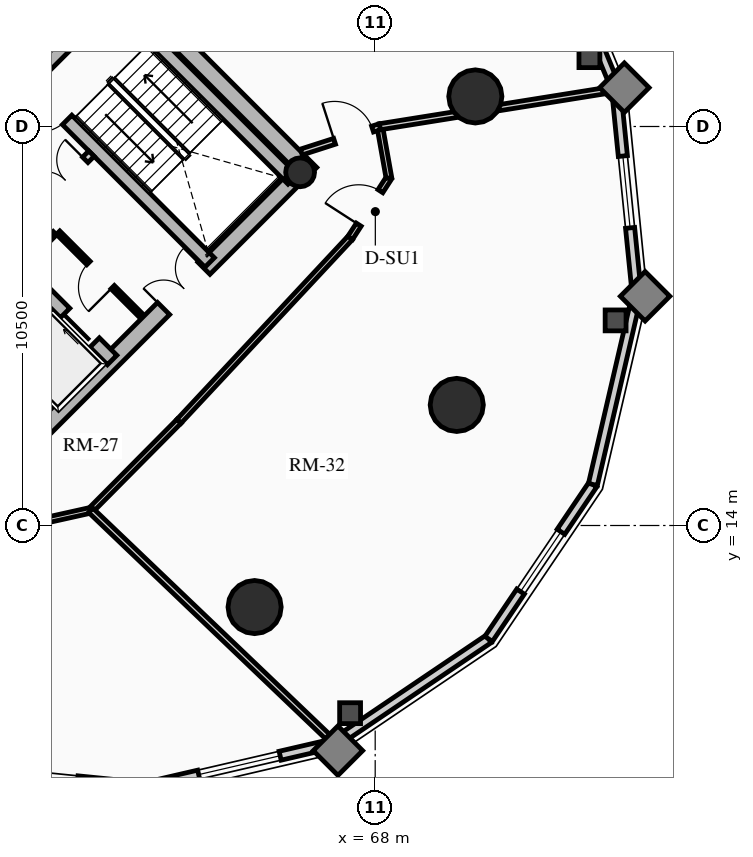
"""IFC4 building model, lengths in metres.
Left out: names, types, materials, properties, quantities, classifications, styles, units other than length and angle.
Written with IfcOpenShell. Run it as: python <this file> out.ifc"""

import sys

from ifc_helpers import new_model, si_unit, direction, frame, frame_2d, origin, origin_2d, place, context, subcontext, project, spatial, rectangle, circle, hollow_circle, extrude, source, transform, mapped, element, fill, save


model = new_model("IFC4")
c1 = context("Model", 3, precision=1e-05, world=origin(), true_north=direction((0.0, 1.0)))
c2 = subcontext(c1, "Body", "Model", "MODEL_VIEW")
j1 = project(units=[si_unit("LENGTHUNIT", "METRE"), si_unit("PLANEANGLEUNIT", "RADIAN")], contexts=[c1])
p1 = place(None, origin())
s1 = spatial("IfcSite", under=j1, at=p1, CompositionType="ELEMENT")
p2 = place(p1, origin())
s2 = spatial("IfcBuilding", under=s1, at=p2, CompositionType="ELEMENT")
p3 = place(p2, frame((0.0, 0.0, 140.32)))
s3 = spatial("IfcBuildingStorey", under=s2, at=p3, CompositionType="ELEMENT", Elevation=140.32)
p4 = place(p3, frame((66.303, 23.263, 0.0), z_axis=(0.0, 0.0, 1.0), x_axis=(-0.707106781187, 0.707106781187, 0.0)))
e1 = element("IfcWall", 1, at=p4, inside=s3, PredefinedType="SHEAR", context=c2, shape_type="SweptSolid", body=[
    extrude(rectangle(XDim=14.2, YDim=0.45, at=frame_2d((7.1, 0.0))), origin(), (0.0, 0.0, 1.0), 3.72),
])
p5 = place(p3, frame((58.578, 15.856, 0.0), z_axis=(0.0, 0.0, 1.0), x_axis=(0.707106781187, 0.707106781187, 0.0)))
e2 = element("IfcWall", 2, at=p5, inside=s3, PredefinedType="SHEAR", context=c2, shape_type="SweptSolid", body=[
    extrude(rectangle(XDim=10.7, YDim=0.45, at=frame_2d((5.35, 0.0))), origin(), (0.0, 0.0, 1.0), 3.72),
])
m1 = source(origin(), c2, "Body", "SweptSolid", [
    extrude(rectangle(XDim=1.5, YDim=2.02, at=frame_2d((0.75, 1.01))), frame((0.0, 0.235, 0.0), z_axis=(0.0, -1.0, 0.0), x_axis=(1.0, 0.0, 0.0)), (0.0, 0.0, 1.0), 0.47),
])
p6 = place(p5, frame((5.45, 0.0, 0.0)))
e3 = element("IfcOpeningElement", 3, at=p6, cuts=e2, PredefinedType="OPENING", context=c2, shape_type="MappedRepresentation", body=[
    mapped(m1, transform((0.0, 0.0, 0.0), x_axis=(1.0, 0.0, 0.0), y_axis=(0.0, 1.0, 0.0), z_axis=(0.0, 0.0, 1.0), scale=1.0)),
])
p7 = place(p3, frame((61.078, 18.355, 0.0), z_axis=(0.0, 0.0, 1.0), x_axis=(-0.707106781187, 0.707106781187, 0.0)))
e4 = element("IfcWall", 4, at=p7, inside=s3, PredefinedType="SHEAR", context=c2, shape_type="SweptSolid", body=[
    extrude(rectangle(XDim=13.75, YDim=0.35, at=frame_2d((6.875, 0.0))), origin(), (0.0, 0.0, 1.0), 3.72),
])
m2 = source(origin(), c2, "Body", "SweptSolid", [
    extrude(rectangle(XDim=1.1, YDim=2.015, at=frame_2d((0.55, 1.007))), frame((0.0, 0.185, 0.0), z_axis=(0.0, -1.0, 0.0), x_axis=(1.0, 0.0, 0.0)), (0.0, 0.0, 1.0), 0.37),
])
p8 = place(p7, frame((4.875, 0.0, 0.0)))
e5 = element("IfcOpeningElement", 5, at=p8, cuts=e4, PredefinedType="OPENING", context=c2, shape_type="MappedRepresentation", body=[
    mapped(m2, transform((0.0, 0.0, 0.0), x_axis=(1.0, 0.0, 0.0), y_axis=(0.0, 1.0, 0.0), z_axis=(0.0, 0.0, 1.0), scale=1.0)),
])
p9 = place(p7, frame((0.65, 0.0, 0.0)))
e6 = element("IfcOpeningElement", 6, at=p9, cuts=e4, PredefinedType="OPENING", context=c2, shape_type="MappedRepresentation", body=[
    mapped(m2, transform((0.0, 0.0, 0.0), x_axis=(1.0, 0.0, 0.0), y_axis=(0.0, 1.0, 0.0), z_axis=(0.0, 0.0, 1.0), scale=1.0)),
])
p10 = place(p7, frame((2.65, 0.0, 0.0)))
e7 = element("IfcOpeningElement", 7, at=p10, cuts=e4, PredefinedType="OPENING", context=c2, shape_type="MappedRepresentation", body=[
    mapped(m2, transform((0.0, 0.0, 0.0), x_axis=(1.0, 0.0, 0.0), y_axis=(0.0, 1.0, 0.0), z_axis=(0.0, 0.0, 1.0), scale=1.0)),
])
m3 = source(origin(), c2, "Body", "SweptSolid", [
    extrude(rectangle(XDim=1.15, YDim=2.02, at=frame_2d((0.575, 1.01))), frame((0.0, 0.185, 0.0), z_axis=(0.0, -1.0, 0.0), x_axis=(1.0, 0.0, 0.0)), (0.0, 0.0, 1.0), 0.37),
])
p11 = place(p7, frame((7.295, 0.0, 0.0)))
e8 = element("IfcOpeningElement", 8, at=p11, cuts=e4, PredefinedType="OPENING", context=c2, shape_type="MappedRepresentation", body=[
    mapped(m3, transform((0.0, 0.0, 0.0), x_axis=(1.0, 0.0, 0.0), y_axis=(0.0, 1.0, 0.0), z_axis=(0.0, 0.0, 1.0), scale=1.0)),
])
p12 = place(p3, frame((63.645, 20.922, 0.0), z_axis=(0.0, 0.0, 1.0), x_axis=(-0.70711946392, 0.707094098226, 0.0)))
e9 = element("IfcWall", 9, at=p12, inside=s3, PredefinedType="SHEAR", context=c2, shape_type="SweptSolid", body=[
    extrude(rectangle(XDim=9.625, YDim=0.35, at=frame_2d((4.812, 0.0))), origin(), (0.0, 0.0, 1.0), 3.72),
])
p13 = place(p12, frame((5.305, 0.0, 0.0)))
e10 = element("IfcOpeningElement", 10, at=p13, cuts=e9, PredefinedType="OPENING", context=c2, shape_type="MappedRepresentation", body=[
    mapped(m3, transform((0.0, 0.0, 0.0), x_axis=(1.0, 0.0, 0.0), y_axis=(0.0, 1.0, 0.0), z_axis=(0.0, 0.0, 1.0), scale=1.0)),
])
p14 = place(p3, frame((65.83, 23.107, 0.0), z_axis=(0.0, 0.0, 1.0), x_axis=(-0.707088616009, 0.707124945897, 0.0)))
e11 = element("IfcWall", 11, at=p14, inside=s3, PredefinedType="SHEAR", context=c2, shape_type="SweptSolid", body=[
    extrude(rectangle(XDim=6.72, YDim=0.35, at=frame_2d((3.36, 0.0))), origin(), (0.0, 0.0, 1.0), 3.72),
])
p15 = place(p3, frame((58.893, 25.674, 0.0), z_axis=(0.0, 0.0, 1.0), x_axis=(0.707106781187, 0.707106781187, 0.0)))
e12 = element("IfcWall", 12, at=p15, inside=s3, PredefinedType="SHEAR", context=c2, shape_type="SweptSolid", body=[
    extrude(rectangle(XDim=3.285, YDim=0.35, at=frame_2d((1.643, 0.0))), origin(), (0.0, 0.0, 1.0), 3.72),
])
p16 = place(p3, frame((66.024, 23.294, 0.0), z_axis=(0.0, 0.0, 1.0), x_axis=(0.707106781187, 0.707106781187, 0.0)))
e13 = element("IfcColumn", 13, at=p16, inside=s3, PredefinedType="COLUMN", context=c2, shape_type="SweptSolid", body=[
    extrude(hollow_circle(Radius=0.38, WallThickness=0.032, at=origin_2d()), origin(), (0.0, 0.0, 1.0), 3.72),
])
for number, where, z_axis, x_axis in (
    (14, (64.827, 11.854, 0.0), (0.0, 0.0, 1.0), (1.0, 0.0, 0.0)),
    (15, (70.146, 17.173, 0.0), (0.0, 0.0, 1.0), (1.0, 0.0, 0.0)),
    (16, (70.635, 25.291, 0.0), (0.0, 0.0, 1.0), (1.0, 0.0, 0.0)),
):
    element("IfcColumn", number, at=place(p3, frame(where, z_axis=z_axis, x_axis=x_axis)), inside=s3, PredefinedType="USERDEFINED", context=c2, shape_type="SweptSolid", body=[
        extrude(circle(Radius=0.7, at=origin_2d()), origin(), (0.0, 0.0, 1.0), 3.72),
    ])
p17 = place(p3, frame((61.933, 7.115, 0.0), z_axis=(0.0, 0.0, 1.0), x_axis=(-0.994971754311, 0.10015591906, 0.0)))
e17 = element("IfcWall", 17, at=p17, inside=s3, PredefinedType="SOLIDWALL", context=c2, shape_type="SweptSolid", body=[
    extrude(rectangle(XDim=5.448, YDim=0.24, at=frame_2d((2.724, 0.0))), origin(), (0.0, 0.0, 1.0), 3.465),
])
m4 = source(origin(), c2, "Body", "SweptSolid", [
    extrude(rectangle(XDim=1.9, YDim=1.35, at=frame_2d((0.95, 0.675))), frame((0.0, 0.13, 0.0), z_axis=(0.0, -1.0, 0.0), x_axis=(1.0, 0.0, 0.0)), (0.0, 0.0, 1.0), 0.26),
])
p18 = place(p17, frame((1.774, 0.0, 0.65)))
e18 = element("IfcOpeningElement", 18, at=p18, cuts=e17, PredefinedType="OPENING", context=c2, shape_type="MappedRepresentation", body=[
    mapped(m4, transform((0.0, 0.0, 0.0), x_axis=(1.0, 0.0, 0.0), y_axis=(0.0, 1.0, 0.0), z_axis=(0.0, 0.0, 1.0), scale=1.0)),
])
p19 = place(p3, frame((66.92, 8.271, 0.0), z_axis=(0.0, 0.0, 1.0), x_axis=(-0.974165631126, -0.225834725257, 0.0)))
e19 = element("IfcWall", 19, at=p19, inside=s3, PredefinedType="SOLIDWALL", context=c2, shape_type="SweptSolid", body=[
    extrude(rectangle(XDim=5.119, YDim=0.24, at=frame_2d((2.56, 0.0))), origin(), (0.0, 0.0, 1.0), 3.465),
])
m5 = source(origin(), c2, "Body", "SweptSolid", [
    extrude(rectangle(XDim=2.2, YDim=1.35, at=frame_2d((1.1, 0.675))), frame((0.0, 0.13, 0.0), z_axis=(0.0, -1.0, 0.0), x_axis=(1.0, 0.0, 0.0)), (0.0, 0.0, 1.0), 0.26),
])
p20 = place(p19, frame((1.459, 0.0, 0.65)))
e20 = element("IfcOpeningElement", 20, at=p20, cuts=e19, PredefinedType="OPENING", context=c2, shape_type="MappedRepresentation", body=[
    mapped(m5, transform((0.0, 0.0, 0.0), x_axis=(1.0, 0.0, 0.0), y_axis=(0.0, 1.0, 0.0), z_axis=(0.0, 0.0, 1.0), scale=1.0)),
])
p21 = place(p3, frame((70.985, 11.015, 0.0), z_axis=(0.0, 0.0, 1.0), x_axis=(-0.828781148131, -0.559572880421, 0.0)))
e21 = element("IfcWall", 21, at=p21, inside=s3, PredefinedType="SOLIDWALL", context=c2, shape_type="SweptSolid", body=[
    extrude(rectangle(XDim=4.905, YDim=0.24, at=frame_2d((2.452, 0.0))), origin(), (0.0, 0.0, 1.0), 3.465),
])
p22 = place(p3, frame((73.729, 15.08, 0.0), z_axis=(0.0, 0.0, 1.0), x_axis=(-0.559572880421, -0.828781148131, 0.0)))
e22 = element("IfcWall", 22, at=p22, inside=s3, PredefinedType="SOLIDWALL", context=c2, shape_type="SweptSolid", body=[
    extrude(rectangle(XDim=4.905, YDim=0.24, at=frame_2d((2.452, 0.0))), origin(), (0.0, 0.0, 1.0), 3.465),
])
p23 = place(p22, frame((1.502, 0.0, 0.65)))
e23 = element("IfcOpeningElement", 23, at=p23, cuts=e22, PredefinedType="OPENING", context=c2, shape_type="MappedRepresentation", body=[
    mapped(m4, transform((0.0, 0.0, 0.0), x_axis=(1.0, 0.0, 0.0), y_axis=(0.0, 1.0, 0.0), z_axis=(0.0, 0.0, 1.0), scale=1.0)),
])
p24 = place(p3, frame((74.885, 20.067, 0.0), z_axis=(0.0, 0.0, 1.0), x_axis=(-0.225834725257, -0.974165631126, 0.0)))
e24 = element("IfcWall", 24, at=p24, inside=s3, PredefinedType="SOLIDWALL", context=c2, shape_type="SweptSolid", body=[
    extrude(rectangle(XDim=5.119, YDim=0.24, at=frame_2d((2.56, 0.0))), origin(), (0.0, 0.0, 1.0), 3.465),
])
p25 = place(p3, frame((74.339, 25.487, 0.0), z_axis=(0.0, 0.0, 1.0), x_axis=(0.10015591906, -0.994971754311, 0.0)))
e25 = element("IfcWall", 25, at=p25, inside=s3, PredefinedType="SOLIDWALL", context=c2, shape_type="SweptSolid", body=[
    extrude(rectangle(XDim=5.448, YDim=0.24, at=frame_2d((2.724, 0.0))), origin(), (0.0, 0.0, 1.0), 3.465),
])
p26 = place(p25, frame((1.774, 0.0, 0.65)))
e26 = element("IfcOpeningElement", 26, at=p26, cuts=e25, PredefinedType="OPENING", context=c2, shape_type="MappedRepresentation", body=[
    mapped(m4, transform((0.0, 0.0, 0.0), x_axis=(1.0, 0.0, 0.0), y_axis=(0.0, 1.0, 0.0), z_axis=(0.0, 0.0, 1.0), scale=1.0)),
])
p27 = place(p3, frame((72.145, 30.811, 0.0), z_axis=(0.0, 0.0, 1.0), x_axis=(0.381027003055, -0.924563909604, 0.0)))
e27 = element("IfcWall", 27, at=p27, inside=s3, PredefinedType="SOLIDWALL", context=c2, shape_type="SweptSolid", body=[
    extrude(rectangle(XDim=5.758, YDim=0.24, at=frame_2d((2.879, 0.0))), origin(), (0.0, 0.0, 1.0), 3.465),
])
p28 = place(p3, frame((58.214, 21.467, 0.0), z_axis=(0.0, 0.0, 1.0), x_axis=(0.707106781187, 0.707106781187, 0.0)))
e28 = element("IfcWall", 28, at=p28, inside=s3, PredefinedType="PARTITIONING", context=c2, shape_type="SweptSolid", body=[
    extrude(rectangle(XDim=3.28, YDim=0.2, at=frame_2d((1.64, 0.0))), origin(), (0.0, 0.0, 1.0), 3.465),
])
m6 = source(origin(), c2, "Body", "SweptSolid", [
    extrude(rectangle(XDim=1.5, YDim=2.02, at=frame_2d((0.75, 1.01))), frame((0.0, 0.11, 0.0), z_axis=(0.0, -1.0, 0.0), x_axis=(1.0, 0.0, 0.0)), (0.0, 0.0, 1.0), 0.22),
])
p29 = place(p28, frame((1.55, 0.0, 0.0)))
e29 = element("IfcOpeningElement", 29, at=p29, cuts=e28, PredefinedType="OPENING", context=c2, shape_type="MappedRepresentation", body=[
    mapped(m6, transform((0.0, 0.0, 0.0), x_axis=(1.0, 0.0, 0.0), y_axis=(0.0, 1.0, 0.0), z_axis=(0.0, 0.0, 1.0), scale=1.0)),
])
p30 = place(p3, frame((61.835, 19.529, 0.0), z_axis=(0.0, 0.0, 1.0), x_axis=(-0.707146413884, 0.707067146267, 0.0)))
e30 = element("IfcWall", 30, at=p30, inside=s3, PredefinedType="PARTITIONING", context=c2, shape_type="SweptSolid", body=[
    extrude(rectangle(XDim=3.08, YDim=0.125, at=frame_2d((1.54, 0.0))), origin(), (0.0, 0.0, 1.0), 3.465),
])
m7 = source(origin(), c2, "Body", "SweptSolid", [
    extrude(rectangle(XDim=0.9, YDim=2.005, at=frame_2d((0.45, 1.002))), frame((0.0, 0.073, 0.0), z_axis=(0.0, -1.0, 0.0), x_axis=(1.0, 0.0, 0.0)), (0.0, 0.0, 1.0), 0.145),
])
p31 = place(p30, frame((1.05, 0.0, 0.0)))
e31 = element("IfcOpeningElement", 31, at=p31, cuts=e30, PredefinedType="OPENING", context=c2, shape_type="MappedRepresentation", body=[
    mapped(m7, transform((0.0, 0.0, 0.0), x_axis=(1.0, 0.0, 0.0), y_axis=(0.0, 1.0, 0.0), z_axis=(0.0, 0.0, 1.0), scale=1.0)),
])
p32 = place(p3, frame((58.794, 20.915, 0.0), z_axis=(0.0, 0.0, 1.0), x_axis=(0.707106781187, 0.707106781187, 0.0)))
e32 = element("IfcWall", 32, at=p32, inside=s3, PredefinedType="PARTITIONING", context=c2, shape_type="SweptSolid", body=[
    extrude(rectangle(XDim=1.1, YDim=0.125, at=frame_2d((0.55, 0.0))), origin(), (0.0, 0.0, 1.0), 3.465),
])
p33 = place(p3, frame((58.971, 14.057, 0.0), z_axis=(0.0, 0.0, 1.0), x_axis=(0.976085233804, 0.217388169756, 0.0)))
e33 = element("IfcWall", 33, at=p33, inside=s3, PredefinedType="PARTITIONING", context=c2, shape_type="SweptSolid", body=[
    extrude(rectangle(XDim=1.581, YDim=0.15, at=frame_2d((0.791, 0.0))), origin(), (0.0, 0.0, 1.0), 3.035),
])
p34 = place(p3, frame((60.515, 14.401, 0.0), z_axis=(0.0, 0.0, 1.0), x_axis=(0.704179607439, 0.710021887316, 0.0)))
e34 = element("IfcWall", 34, at=p34, inside=s3, PredefinedType="PARTITIONING", context=c2, shape_type="SweptSolid", body=[
    extrude(rectangle(XDim=3.301, YDim=0.15, at=frame_2d((1.651, 0.0))), origin(), (0.0, 0.0, 1.0), 3.035),
])
p35 = place(p3, frame((62.839, 16.745, 0.0), z_axis=(0.0, 0.0, 1.0), x_axis=(0.682386779427, 0.73099130177, 0.0)))
e35 = element("IfcWall", 35, at=p35, inside=s3, PredefinedType="PARTITIONING", context=c2, shape_type="SweptSolid", body=[
    extrude(rectangle(XDim=6.6, YDim=0.15, at=frame_2d((3.3, 0.0))), origin(), (0.0, 0.0, 1.0), 3.035),
])
p36 = place(p3, frame((67.343, 21.569, 0.0), z_axis=(0.0, 0.0, 1.0), x_axis=(0.542722446786, 0.83991210597, 0.0)))
e36 = element("IfcWall", 36, at=p36, inside=s3, PredefinedType="PARTITIONING", context=c2, shape_type="SweptSolid", body=[
    extrude(rectangle(XDim=1.876, YDim=0.15, at=frame_2d((0.938, 0.0))), origin(), (0.0, 0.0, 1.0), 3.035),
])
m8 = source(origin(), c2, "Body", "SweptSolid", [
    extrude(rectangle(XDim=1.05, YDim=2.015, at=frame_2d((0.525, 1.007))), frame((0.0, 0.085, 0.0), z_axis=(0.0, -1.0, 0.0), x_axis=(1.0, 0.0, 0.0)), (0.0, 0.0, 1.0), 0.17),
])
p37 = place(p36, frame((0.413, 0.0, 0.0)))
e37 = element("IfcOpeningElement", 37, at=p37, cuts=e36, PredefinedType="OPENING", context=c2, shape_type="MappedRepresentation", body=[
    mapped(m8, transform((0.0, 0.0, 0.0), x_axis=(1.0, 0.0, 0.0), y_axis=(0.0, 1.0, 0.0), z_axis=(0.0, 0.0, 1.0), scale=1.0)),
])
p38 = place(p3, frame((68.362, 23.145, 0.0), z_axis=(0.0, 0.0, 1.0), x_axis=(-0.175605524171, 0.984460613677, 0.0)))
e38 = element("IfcWall", 38, at=p38, inside=s3, PredefinedType="PARTITIONING", context=c2, shape_type="SweptSolid", body=[
    extrude(rectangle(XDim=1.369, YDim=0.15, at=frame_2d((0.685, 0.0))), origin(), (0.0, 0.0, 1.0), 3.035),
])
p39 = place(p3, frame((60.515, 14.401, 0.0), z_axis=(0.0, 0.0, 1.0), x_axis=(0.722998961483, -0.690849116446, 0.0)))
e39 = element("IfcWall", 39, at=p39, inside=s3, PredefinedType="PARTITIONING", context=c2, shape_type="SweptSolid", body=[
    extrude(rectangle(XDim=8.847, YDim=0.16, at=frame_2d((4.423, 0.0))), origin(), (0.0, 0.0, 1.0), 2.989),
])
p40 = place(p3, frame((68.121, 24.493, 0.0), z_axis=(0.0, 0.0, 1.0), x_axis=(0.987466345552, 0.15782970697, 0.0)))
e40 = element("IfcWall", 40, at=p40, inside=s3, PredefinedType="PARTITIONING", context=c2, shape_type="SweptSolid", body=[
    extrude(rectangle(XDim=6.277, YDim=0.16, at=frame_2d((3.139, 0.0))), origin(), (0.0, 0.0, 1.0), 2.989),
])
p41 = place(p3, frame((66.056, 23.828, 0.0), z_axis=(0.0, 0.0, 1.0), x_axis=(0.951830504244, 0.306624674792, 0.0)))
e41 = element("IfcWall", 41, at=p41, inside=s3, PredefinedType="PARTITIONING", context=c2, shape_type="SweptSolid", body=[
    extrude(rectangle(XDim=2.17, YDim=0.16, at=frame_2d((1.085, 0.0))), origin(), (0.0, 0.0, 1.0), 3.035),
])
m9 = source(origin(), c2, "Body", "SweptSolid", [
    extrude(rectangle(XDim=1.05, YDim=2.015, at=frame_2d((0.525, 1.007))), frame((0.0, 0.09, 0.0), z_axis=(0.0, -1.0, 0.0), x_axis=(1.0, 0.0, 0.0)), (0.0, 0.0, 1.0), 0.18),
])
p42 = place(p41, frame((0.92, 0.0, 0.0)))
e42 = element("IfcOpeningElement", 42, at=p42, cuts=e41, PredefinedType="OPENING", context=c2, shape_type="MappedRepresentation", body=[
    mapped(m9, transform((0.0, 0.0, 0.0), x_axis=(1.0, 0.0, 0.0), y_axis=(0.0, 1.0, 0.0), z_axis=(0.0, 0.0, 1.0), scale=1.0)),
])
m10 = source(origin(), c2, "Body", "SweptSolid", [
    extrude(rectangle(XDim=1.9, YDim=1.35, at=frame_2d((0.95, 0.675))), frame((0.0, 0.03, 0.0), z_axis=(0.0, -1.0, 0.0), x_axis=(1.0, 0.0, 0.0)), (0.0, 0.0, 1.0), 0.06),
])
p43 = place(p18, origin())
e43 = element("IfcWindow", 43, at=p43, inside=s3, PartitioningType="DOUBLE_PANEL_VERTICAL", PredefinedType="WINDOW", context=c2, shape_type="MappedRepresentation", body=[
    mapped(m10, transform((0.0, 0.0, 0.0), x_axis=(1.0, 0.0, 0.0), y_axis=(0.0, 1.0, 0.0), z_axis=(0.0, 0.0, 1.0), scale=1.0)),
])
fill(e18, e43)
m11 = source(origin(), c2, "Body", "SweptSolid", [
    extrude(rectangle(XDim=2.2, YDim=1.35, at=frame_2d((1.1, 0.675))), frame((0.0, 0.03, 0.0), z_axis=(0.0, -1.0, 0.0), x_axis=(1.0, 0.0, 0.0)), (0.0, 0.0, 1.0), 0.06),
])
p44 = place(p20, origin())
e44 = element("IfcWindow", 44, at=p44, inside=s3, PartitioningType="DOUBLE_PANEL_VERTICAL", PredefinedType="WINDOW", context=c2, shape_type="MappedRepresentation", body=[
    mapped(m11, transform((0.0, 0.0, 0.0), x_axis=(1.0, 0.0, 0.0), y_axis=(0.0, 1.0, 0.0), z_axis=(0.0, 0.0, 1.0), scale=1.0)),
])
fill(e20, e44)
p45 = place(p23, origin())
e45 = element("IfcWindow", 45, at=p45, inside=s3, PartitioningType="DOUBLE_PANEL_VERTICAL", PredefinedType="WINDOW", context=c2, shape_type="MappedRepresentation", body=[
    mapped(m10, transform((0.0, 0.0, 0.0), x_axis=(1.0, 0.0, 0.0), y_axis=(0.0, 1.0, 0.0), z_axis=(0.0, 0.0, 1.0), scale=1.0)),
])
fill(e23, e45)
p46 = place(p26, origin())
e46 = element("IfcWindow", 46, at=p46, inside=s3, PartitioningType="DOUBLE_PANEL_VERTICAL", PredefinedType="WINDOW", context=c2, shape_type="MappedRepresentation", body=[
    mapped(m10, transform((0.0, 0.0, 0.0), x_axis=(1.0, 0.0, 0.0), y_axis=(0.0, 1.0, 0.0), z_axis=(0.0, 0.0, 1.0), scale=1.0)),
])
fill(e26, e46)
m12 = source(origin(), c2, "Body", "SweptSolid", [
    extrude(rectangle(XDim=1.1, YDim=2.015, at=frame_2d((0.55, 1.007))), frame((0.0, 0.025, 0.0), z_axis=(0.0, -1.0, 0.0), x_axis=(1.0, 0.0, 0.0)), (0.0, 0.0, 1.0), 0.05),
])
p47 = place(p9, origin())
e47 = element("IfcDoor", 47, at=p47, inside=s3, OperationType="SLIDING_TO_RIGHT", PredefinedType="DOOR", context=c2, shape_type="MappedRepresentation", body=[
    mapped(m12, transform((0.0, 0.0, 0.0), x_axis=(1.0, 0.0, 0.0), y_axis=(0.0, 1.0, 0.0), z_axis=(0.0, 0.0, 1.0), scale=1.0)),
])
fill(e6, e47)
m13 = source(origin(), c2, "Body", "SweptSolid", [
    extrude(rectangle(XDim=1.15, YDim=2.02, at=frame_2d((0.575, 1.01))), frame((0.0, 0.025, 0.0), z_axis=(0.0, -1.0, 0.0), x_axis=(1.0, 0.0, 0.0)), (0.0, 0.0, 1.0), 0.05),
])
p48 = place(p13, origin())
e48 = element("IfcDoor", 48, at=p48, inside=s3, OperationType="SINGLE_SWING_RIGHT", PredefinedType="DOOR", context=c2, shape_type="MappedRepresentation", body=[
    mapped(m13, transform((0.0, 0.0, 0.0), x_axis=(1.0, 0.0, 0.0), y_axis=(0.0, 1.0, 0.0), z_axis=(0.0, 0.0, 1.0), scale=1.0)),
])
fill(e10, e48)
m14 = source(origin(), c2, "Body", "SweptSolid", [
    extrude(rectangle(XDim=1.5, YDim=2.02, at=frame_2d((0.75, 1.01))), frame((0.0, 0.025, 0.0), z_axis=(0.0, -1.0, 0.0), x_axis=(1.0, 0.0, 0.0)), (0.0, 0.0, 1.0), 0.05),
])
p49 = place(p6, origin())
e49 = element("IfcDoor", 49, at=p49, inside=s3, OperationType="DOUBLE_DOOR_SINGLE_SWING", PredefinedType="DOOR", context=c2, shape_type="MappedRepresentation", body=[
    mapped(m14, transform((0.0, 0.0, 0.0), x_axis=(1.0, 0.0, 0.0), y_axis=(0.0, 1.0, 0.0), z_axis=(0.0, 0.0, 1.0), scale=1.0)),
])
fill(e3, e49)
p50 = place(p29, origin())
e50 = element("IfcDoor", 50, at=p50, inside=s3, OperationType="DOUBLE_DOOR_SINGLE_SWING", PredefinedType="DOOR", context=c2, shape_type="MappedRepresentation", body=[
    mapped(m14, transform((0.0, 0.0, 0.0), x_axis=(1.0, 0.0, 0.0), y_axis=(0.0, 1.0, 0.0), z_axis=(0.0, 0.0, 1.0), scale=1.0)),
])
fill(e29, e50)
m15 = source(origin(), c2, "Body", "SweptSolid", [
    extrude(rectangle(XDim=0.9, YDim=2.005, at=frame_2d((0.45, 1.002))), frame((0.0, 0.025, 0.0), z_axis=(0.0, -1.0, 0.0), x_axis=(1.0, 0.0, 0.0)), (0.0, 0.0, 1.0), 0.05),
])
p51 = place(p31, origin())
e51 = element("IfcDoor", 51, at=p51, inside=s3, OperationType="SINGLE_SWING_LEFT", PredefinedType="DOOR", context=c2, shape_type="MappedRepresentation", body=[
    mapped(m15, transform((0.0, 0.0, 0.0), x_axis=(1.0, 0.0, 0.0), y_axis=(0.0, 1.0, 0.0), z_axis=(0.0, 0.0, 1.0), scale=1.0)),
])
fill(e31, e51)
m16 = source(origin(), c2, "Body", "SweptSolid", [
    extrude(rectangle(XDim=1.05, YDim=2.015, at=frame_2d((0.525, 1.007))), frame((0.0, 0.025, 0.0), z_axis=(0.0, -1.0, 0.0), x_axis=(1.0, 0.0, 0.0)), (0.0, 0.0, 1.0), 0.05),
])
p52 = place(p42, origin())
e52 = element("IfcDoor", 52, at=p52, inside=s3, OperationType="SINGLE_SWING_LEFT", PredefinedType="DOOR", context=c2, shape_type="MappedRepresentation", body=[
    mapped(m16, transform((0.0, 0.0, 0.0), x_axis=(1.0, 0.0, 0.0), y_axis=(0.0, 1.0, 0.0), z_axis=(0.0, 0.0, 1.0), scale=1.0)),
])
fill(e42, e52)
p53 = place(p37, origin())
e53 = element("IfcDoor", 53, at=p53, inside=s3, OperationType="SINGLE_SWING_LEFT", PredefinedType="DOOR", context=c2, shape_type="MappedRepresentation", body=[
    mapped(m16, transform((0.0, 0.0, 0.0), x_axis=(1.0, 0.0, 0.0), y_axis=(0.0, 1.0, 0.0), z_axis=(0.0, 0.0, 1.0), scale=1.0)),
])
fill(e37, e53)
save(model, sys.argv[1])
